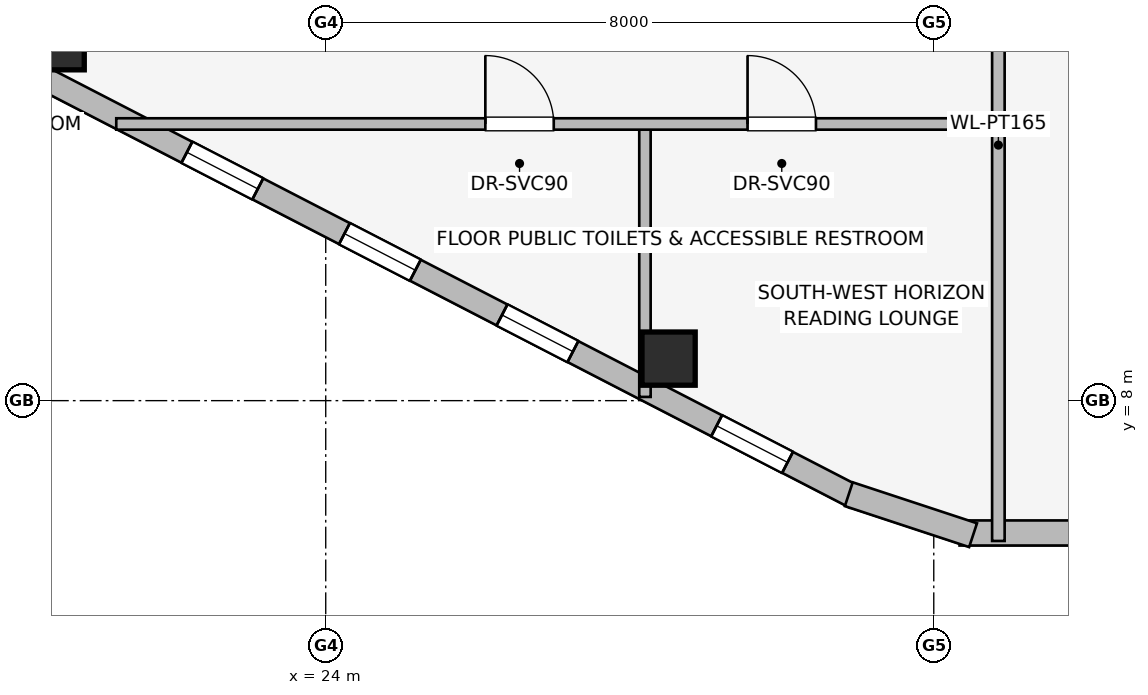
"""IFC4 building model, lengths in metres.
Left out: names, types, materials, properties, quantities, classifications, styles, units other than length and angle.
Written with IfcOpenShell. Run it as: python <this file> out.ifc"""

import sys

from ifc_helpers import new_model, si_unit, direction, frame, frame_2d, origin, origin_2d, place, context, subcontext, project, spatial, rectangle, extrude, element, fill, save


model = new_model("IFC4")
c1 = context("Model", 3, precision=1e-05, world=origin(), true_north=direction((0.0, 1.0)))
c2 = subcontext(c1, "Body", "Model", "MODEL_VIEW")
j1 = project(units=[si_unit("LENGTHUNIT", "METRE"), si_unit("PLANEANGLEUNIT", "RADIAN")], contexts=[c1])
p1 = place(None, origin())
s1 = spatial("IfcSite", under=j1, at=p1, CompositionType="ELEMENT")
p2 = place(p1, origin())
s2 = spatial("IfcBuilding", under=s1, at=p2, CompositionType="ELEMENT")
p3 = place(p2, frame((0.0, 0.0, 266.75)))
s3 = spatial("IfcBuildingStorey", under=s2, at=p3, CompositionType="ELEMENT", Elevation=266.75)
for number, where, z_axis, x_axis in (
    (1, (20.473, 12.702, 0.0), (0.0, 0.0, 1.0), (1.0, 0.0, 0.0)),
    (2, (28.511, 8.553, 0.0), (0.0, 0.0, 1.0), (1.0, 0.0, 0.0)),
):
    element("IfcColumn", number, at=place(p3, frame(where, z_axis=z_axis, x_axis=x_axis)), inside=s3, PredefinedType="COLUMN", context=c2, shape_type="SweptSolid", body=[
        extrude(rectangle(XDim=0.7, YDim=0.7, at=origin_2d()), origin(), (0.0, 0.0, 1.0), 3.55),
    ])
p4 = place(p3, frame((30.963, 6.73, 0.0), z_axis=(0.0, 0.0, 1.0), x_axis=(-0.888581481622, 0.458718814218, 0.0)))
e3 = element("IfcWall", 3, at=p4, inside=s3, PredefinedType="STANDARD", context=c2, shape_type="SweptSolid", body=[
    extrude(rectangle(XDim=15.077, YDim=0.31, at=frame_2d((7.539, 0.0))), origin(), (0.0, 0.0, 1.0), 3.24),
])
p5 = place(p4, frame((0.998, 0.0, 0.75)))
e4 = element("IfcOpeningElement", 4, at=p5, cuts=e3, PredefinedType="OPENING", context=c2, shape_type="SweptSolid", body=[
    extrude(rectangle(XDim=1.05, YDim=1.4, at=frame_2d((0.525, 0.7))), frame((0.0, 0.165, 0.0), z_axis=(0.0, -1.0, 0.0), x_axis=(1.0, 0.0, 0.0)), (0.0, 0.0, 1.0), 0.33),
])
p6 = place(p4, frame((4.176, 0.0, 0.75)))
e5 = element("IfcOpeningElement", 5, at=p6, cuts=e3, PredefinedType="OPENING", context=c2, shape_type="SweptSolid", body=[
    extrude(rectangle(XDim=1.05, YDim=1.4, at=frame_2d((0.525, 0.7))), frame((0.0, 0.165, 0.0), z_axis=(0.0, -1.0, 0.0), x_axis=(1.0, 0.0, 0.0)), (0.0, 0.0, 1.0), 0.33),
])
p7 = place(p4, frame((6.509, 0.0, 0.75)))
e6 = element("IfcOpeningElement", 6, at=p7, cuts=e3, PredefinedType="OPENING", context=c2, shape_type="SweptSolid", body=[
    extrude(rectangle(XDim=1.05, YDim=1.4, at=frame_2d((0.525, 0.7))), frame((0.0, 0.165, 0.0), z_axis=(0.0, -1.0, 0.0), x_axis=(1.0, 0.0, 0.0)), (0.0, 0.0, 1.0), 0.33),
])
p8 = place(p4, frame((8.842, 0.0, 0.75)))
e7 = element("IfcOpeningElement", 7, at=p8, cuts=e3, PredefinedType="OPENING", context=c2, shape_type="SweptSolid", body=[
    extrude(rectangle(XDim=1.05, YDim=1.4, at=frame_2d((0.525, 0.7))), frame((0.0, 0.165, 0.0), z_axis=(0.0, -1.0, 0.0), x_axis=(1.0, 0.0, 0.0)), (0.0, 0.0, 1.0), 0.33),
])
p9 = place(p3, frame((34.061, 6.259, 0.0), z_axis=(0.0, 0.0, 1.0), x_axis=(-1.0, 0.0, 0.0)))
e8 = element("IfcWall", 8, at=p9, inside=s3, PredefinedType="STANDARD", context=c2, shape_type="SweptSolid", body=[
    extrude(rectangle(XDim=1.722, YDim=0.33, at=frame_2d((0.861, 0.0))), origin(), (0.0, 0.0, 1.0), 3.24),
])
p10 = place(p3, frame((32.517, 6.23, 0.0), z_axis=(0.0, 0.0, 1.0), x_axis=(-0.949713440491, 0.313120393699, 0.0)))
e9 = element("IfcWall", 9, at=p10, inside=s3, PredefinedType="STANDARD", context=c2, shape_type="SweptSolid", body=[
    extrude(rectangle(XDim=1.722, YDim=0.33, at=frame_2d((0.861, 0.0))), origin(), (0.0, 0.0, 1.0), 3.24),
])
p11 = place(p3, frame((32.85, 6.154, 0.0), z_axis=(0.0, 0.0, 1.0), x_axis=(0.0, 1.0, 0.0)))
e10 = element("IfcWall", 10, at=p11, inside=s3, PredefinedType="PARTITIONING", context=c2, shape_type="SweptSolid", body=[
    extrude(rectangle(XDim=10.416, YDim=0.165, at=frame_2d((5.208, 0.0))), origin(), (0.0, 0.0, 1.0), 3.24),
])
p12 = place(p3, frame((28.2, 8.049, 0.0), z_axis=(0.0, 0.0, 1.0), x_axis=(0.0, 1.0, 0.0)))
e11 = element("IfcWall", 11, at=p12, inside=s3, PredefinedType="PARTITIONING", context=c2, shape_type="SweptSolid", body=[
    extrude(rectangle(XDim=3.591, YDim=0.15, at=frame_2d((1.795, 0.0))), origin(), (0.0, 0.0, 1.0), 3.24),
])
p13 = place(p3, frame((21.244, 11.64, 0.0), z_axis=(0.0, 0.0, 1.0), x_axis=(1.0, 0.0, 0.0)))
e12 = element("IfcWall", 12, at=p13, inside=s3, PredefinedType="PARTITIONING", context=c2, shape_type="SweptSolid", body=[
    extrude(rectangle(XDim=11.606, YDim=0.15, at=frame_2d((5.803, 0.0))), origin(), (0.0, 0.0, 1.0), 2.783),
])
p14 = place(p13, frame((4.856, 0.0, 0.0)))
e13 = element("IfcOpeningElement", 13, at=p14, cuts=e12, PredefinedType="OPENING", context=c2, shape_type="SweptSolid", body=[
    extrude(rectangle(XDim=0.9, YDim=2.0, at=frame_2d((0.45, 1.0))), frame((0.0, 0.085, 0.0), z_axis=(0.0, -1.0, 0.0), x_axis=(1.0, 0.0, 0.0)), (0.0, 0.0, 1.0), 0.17),
])
p15 = place(p13, frame((8.306, 0.0, 0.0)))
e14 = element("IfcOpeningElement", 14, at=p15, cuts=e12, PredefinedType="OPENING", context=c2, shape_type="SweptSolid", body=[
    extrude(rectangle(XDim=0.9, YDim=2.0, at=frame_2d((0.45, 1.0))), frame((0.0, 0.085, 0.0), z_axis=(0.0, -1.0, 0.0), x_axis=(1.0, 0.0, 0.0)), (0.0, 0.0, 1.0), 0.17),
])
p16 = place(p5, origin())
e15 = element("IfcWindow", 15, at=p16, inside=s3, PartitioningType="SINGLE_PANEL", PredefinedType="WINDOW", context=c2, shape_type="SweptSolid", body=[
    extrude(rectangle(XDim=1.05, YDim=1.4, at=frame_2d((0.525, 0.7))), frame((0.0, 0.03, 0.0), z_axis=(0.0, -1.0, 0.0), x_axis=(1.0, 0.0, 0.0)), (0.0, 0.0, 1.0), 0.06),
])
fill(e4, e15)
p17 = place(p6, origin())
e16 = element("IfcWindow", 16, at=p17, inside=s3, PartitioningType="SINGLE_PANEL", PredefinedType="WINDOW", context=c2, shape_type="SweptSolid", body=[
    extrude(rectangle(XDim=1.05, YDim=1.4, at=frame_2d((0.525, 0.7))), frame((0.0, 0.03, 0.0), z_axis=(0.0, -1.0, 0.0), x_axis=(1.0, 0.0, 0.0)), (0.0, 0.0, 1.0), 0.06),
])
fill(e5, e16)
p18 = place(p7, origin())
e17 = element("IfcWindow", 17, at=p18, inside=s3, PartitioningType="SINGLE_PANEL", PredefinedType="WINDOW", context=c2, shape_type="SweptSolid", body=[
    extrude(rectangle(XDim=1.05, YDim=1.4, at=frame_2d((0.525, 0.7))), frame((0.0, 0.03, 0.0), z_axis=(0.0, -1.0, 0.0), x_axis=(1.0, 0.0, 0.0)), (0.0, 0.0, 1.0), 0.06),
])
fill(e6, e17)
p19 = place(p8, origin())
e18 = element("IfcWindow", 18, at=p19, inside=s3, PartitioningType="SINGLE_PANEL", PredefinedType="WINDOW", context=c2, shape_type="SweptSolid", body=[
    extrude(rectangle(XDim=1.05, YDim=1.4, at=frame_2d((0.525, 0.7))), frame((0.0, 0.03, 0.0), z_axis=(0.0, -1.0, 0.0), x_axis=(1.0, 0.0, 0.0)), (0.0, 0.0, 1.0), 0.06),
])
fill(e7, e18)
p20 = place(p14, origin())
e19 = element("IfcDoor", 19, at=p20, inside=s3, OperationType="SINGLE_SWING_LEFT", PredefinedType="DOOR", context=c2, shape_type="SweptSolid", body=[
    extrude(rectangle(XDim=0.9, YDim=2.0, at=frame_2d((0.45, 1.0))), frame((0.0, 0.025, 0.0), z_axis=(0.0, -1.0, 0.0), x_axis=(1.0, 0.0, 0.0)), (0.0, 0.0, 1.0), 0.05),
])
fill(e13, e19)
p21 = place(p15, origin())
e20 = element("IfcDoor", 20, at=p21, inside=s3, OperationType="SINGLE_SWING_LEFT", PredefinedType="DOOR", context=c2, shape_type="SweptSolid", body=[
    extrude(rectangle(XDim=0.9, YDim=2.0, at=frame_2d((0.45, 1.0))), frame((0.0, 0.025, 0.0), z_axis=(0.0, -1.0, 0.0), x_axis=(1.0, 0.0, 0.0)), (0.0, 0.0, 1.0), 0.05),
])
fill(e14, e20)
save(model, sys.argv[1])
